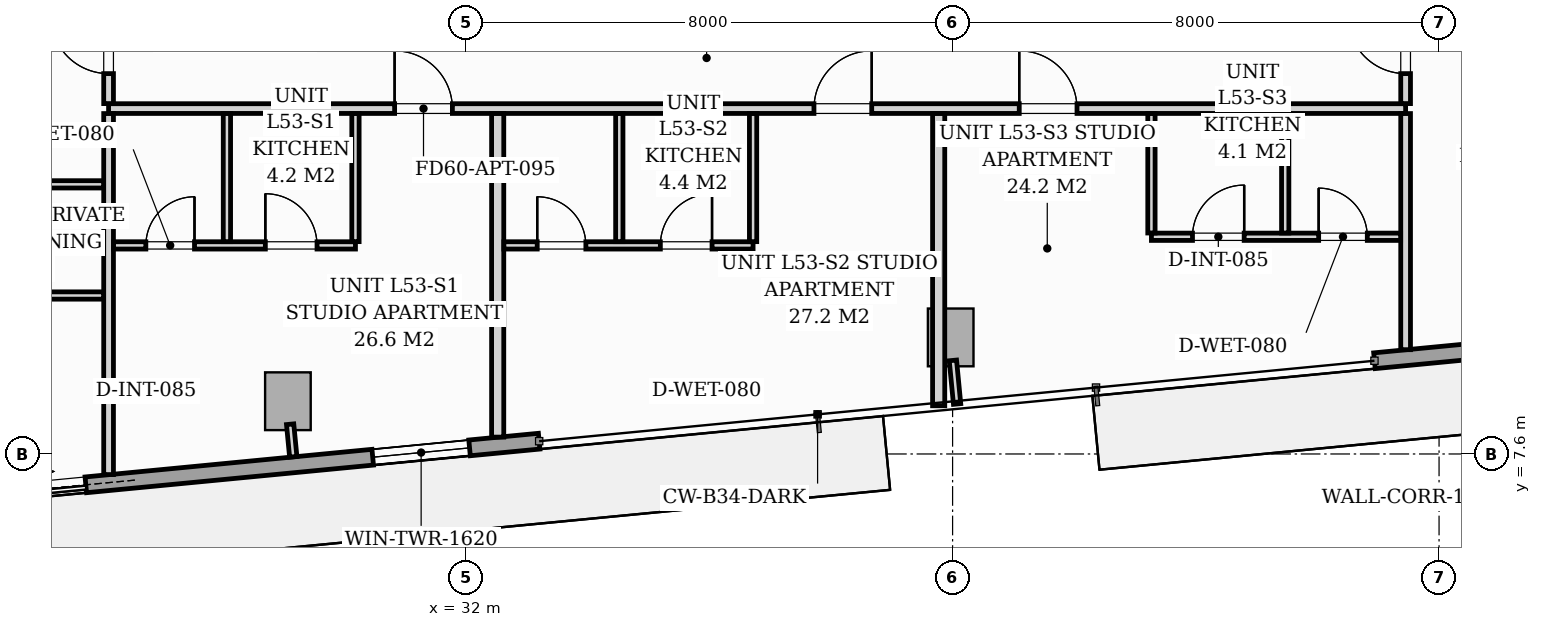
"""IFC4 building model, lengths in metres.
Left out: names, types, materials, properties, quantities, classifications, styles, units other than length and angle.
Written with IfcOpenShell. Run it as: python <this file> out.ifc"""

import sys

from ifc_helpers import new_model, si_unit, direction, frame, frame_2d, origin, origin_2d, place, context, subcontext, project, spatial, rectangle, extrude, source, transform, mapped, element, fill, save


model = new_model("IFC4")
c1 = context("Model", 3, precision=1e-05, world=origin(), true_north=direction((0.0, 1.0)))
c2 = subcontext(c1, "Body", "Model", "MODEL_VIEW")
j1 = project(units=[si_unit("LENGTHUNIT", "METRE"), si_unit("PLANEANGLEUNIT", "RADIAN")], contexts=[c1])
p1 = place(None, origin())
s1 = spatial("IfcSite", under=j1, at=p1, CompositionType="ELEMENT")
p2 = place(p1, origin())
s2 = spatial("IfcBuilding", under=s1, at=p2, CompositionType="ELEMENT")
p3 = place(p2, frame((0.0, 0.0, 185.8)))
s3 = spatial("IfcBuildingStorey", under=s2, at=p3, CompositionType="ELEMENT", Elevation=185.8)
m1 = source(origin(), c2, "Body", "SweptSolid", [
    extrude(rectangle(XDim=0.75, YDim=0.95, at=origin_2d()), origin(), (0.0, 0.0, 1.0), 3.196),
])
for number, where, z_axis, x_axis in (
    (1, (29.069, 8.467, 0.002), (0.0, 0.0, 1.0), (0.995, 0.096, 0.0)),
    (2, (39.969, 9.517, 0.002), (0.0, 0.0, 1.0), (0.995, 0.096, 0.0)),
):
    element("IfcColumn", number, at=place(p3, frame(where, z_axis=z_axis, x_axis=x_axis)), inside=s3, PredefinedType="COLUMN", context=c2, shape_type="MappedRepresentation", body=[
        mapped(m1, transform((0.0, 0.0, 0.0), scale=1.0)),
    ])
p4 = place(p3, frame((62.963, 10.676, 0.0), z_axis=(0.0, 0.0, 1.0), x_axis=(-0.995395627913, -0.095851676732, 0.0)))
e3 = element("IfcWall", 3, at=p4, inside=s3, PredefinedType="STANDARD", context=c2, shape_type="SweptSolid", body=[
    extrude(rectangle(XDim=16.1, YDim=0.26, at=frame_2d((8.05, 0.0))), origin(), (0.0, 0.0, 1.0), 2.94),
])
p5 = place(p4, frame((8.101, 0.0, 0.0)))
e4 = element("IfcOpeningElement", 4, at=p5, cuts=e3, PredefinedType="OPENING", context=c2, shape_type="SweptSolid", body=[
    extrude(rectangle(XDim=1.8, YDim=2.06, at=frame_2d((0.9, 1.03))), frame((0.0, 0.14, 0.0), z_axis=(0.0, -1.0, 0.0), x_axis=(1.0, 0.0, 0.0)), (0.0, 0.0, 1.0), 0.28),
])
p6 = place(p4, frame((2.05, 0.0, 0.65)))
e5 = element("IfcOpeningElement", 5, at=p6, cuts=e3, PredefinedType="OPENING", context=c2, shape_type="SweptSolid", body=[
    extrude(rectangle(XDim=1.6, YDim=1.5, at=frame_2d((0.8, 0.75))), frame((0.0, 0.14, 0.0), z_axis=(0.0, -1.0, 0.0), x_axis=(1.0, 0.0, 0.0)), (0.0, 0.0, 1.0), 0.28),
])
p7 = place(p3, frame((33.201, 7.81, 0.0), z_axis=(0.0, 0.0, 1.0), x_axis=(-0.995397074604, -0.095836652014, 0.0)))
e6 = element("IfcWall", 6, at=p7, inside=s3, PredefinedType="STANDARD", context=c2, shape_type="SweptSolid", body=[
    extrude(rectangle(XDim=16.1, YDim=0.26, at=frame_2d((8.05, 0.0))), origin(), (0.0, 0.0, 1.0), 2.94),
])
p8 = place(p7, frame((7.49, 0.0, 0.0)))
e7 = element("IfcOpeningElement", 7, at=p8, cuts=e6, PredefinedType="OPENING", context=c2, shape_type="SweptSolid", body=[
    extrude(rectangle(XDim=1.8, YDim=2.06, at=frame_2d((0.9, 1.03))), frame((0.0, 0.14, 0.0), z_axis=(0.0, -1.0, 0.0), x_axis=(1.0, 0.0, 0.0)), (0.0, 0.0, 1.0), 0.28),
])
p9 = place(p7, frame((1.15, 0.0, 0.65)))
e8 = element("IfcOpeningElement", 8, at=p9, cuts=e6, PredefinedType="OPENING", context=c2, shape_type="SweptSolid", body=[
    extrude(rectangle(XDim=1.6, YDim=1.5, at=frame_2d((0.8, 0.75))), frame((0.0, 0.14, 0.0), z_axis=(0.0, -1.0, 0.0), x_axis=(1.0, 0.0, 0.0)), (0.0, 0.0, 1.0), 0.28),
])
p10 = place(p3, frame((26.12, 13.28, 0.0), z_axis=(0.0, 0.0, 1.0), x_axis=(1.0, 0.0, 0.0)))
e9 = element("IfcWall", 9, at=p10, inside=s3, PredefinedType="PARTITIONING", context=c2, shape_type="SweptSolid", body=[
    extrude(rectangle(XDim=21.33, YDim=0.16, at=frame_2d((10.665, 0.0))), origin(), (0.0, 0.0, 1.0), 2.94),
])
p11 = place(p10, frame((4.704, 0.0, 0.0)))
e10 = element("IfcOpeningElement", 10, at=p11, cuts=e9, PredefinedType="OPENING", context=c2, shape_type="SweptSolid", body=[
    extrude(rectangle(XDim=0.95, YDim=2.06, at=frame_2d((0.475, 1.03))), frame((0.0, 0.09, 0.0), z_axis=(0.0, -1.0, 0.0), x_axis=(1.0, 0.0, 0.0)), (0.0, 0.0, 1.0), 0.18),
])
p12 = place(p10, frame((11.6, 0.0, 0.0)))
e11 = element("IfcOpeningElement", 11, at=p12, cuts=e9, PredefinedType="OPENING", context=c2, shape_type="SweptSolid", body=[
    extrude(rectangle(XDim=0.95, YDim=2.06, at=frame_2d((0.475, 1.03))), frame((0.0, 0.09, 0.0), z_axis=(0.0, -1.0, 0.0), x_axis=(1.0, 0.0, 0.0)), (0.0, 0.0, 1.0), 0.18),
])
p13 = place(p10, frame((14.976, 0.0, 0.0)))
e12 = element("IfcOpeningElement", 12, at=p13, cuts=e9, PredefinedType="OPENING", context=c2, shape_type="SweptSolid", body=[
    extrude(rectangle(XDim=0.95, YDim=2.06, at=frame_2d((0.475, 1.03))), frame((0.0, 0.09, 0.0), z_axis=(0.0, -1.0, 0.0), x_axis=(1.0, 0.0, 0.0)), (0.0, 0.0, 1.0), 0.18),
])
p14 = place(p3, frame((26.12, 7.261, 0.0), z_axis=(0.0, 0.0, 1.0), x_axis=(0.0, 1.0, 0.0)))
e13 = element("IfcWall", 13, at=p14, inside=s3, PredefinedType="PARTITIONING", context=c2, shape_type="SweptSolid", body=[
    extrude(rectangle(XDim=5.937, YDim=0.16, at=frame_2d((2.968, 0.0))), origin(), (0.0, 0.0, 1.0), 2.94),
])
p15 = place(p3, frame((26.12, 13.362, 0.0), z_axis=(0.0, 0.0, 1.0), x_axis=(0.0, 1.0, 0.0)))
e14 = element("IfcWall", 14, at=p15, inside=s3, PredefinedType="PARTITIONING", context=c2, shape_type="SweptSolid", body=[
    extrude(rectangle(XDim=4.44, YDim=0.16, at=frame_2d((2.22, 0.0))), origin(), (0.0, 0.0, 1.0), 2.94),
])
p16 = place(p15, frame((0.493, 0.0, 0.0)))
e15 = element("IfcOpeningElement", 15, at=p16, cuts=e14, PredefinedType="OPENING", context=c2, shape_type="SweptSolid", body=[
    extrude(rectangle(XDim=0.95, YDim=2.06, at=frame_2d((0.475, 1.03))), frame((0.0, 0.09, 0.0), z_axis=(0.0, -1.0, 0.0), x_axis=(1.0, 0.0, 0.0)), (0.0, 0.0, 1.0), 0.18),
])
p17 = place(p3, frame((47.45, 9.315, 0.0), z_axis=(0.0, 0.0, 1.0), x_axis=(0.0, 1.0, 0.0)))
e16 = element("IfcWall", 16, at=p17, inside=s3, PredefinedType="PARTITIONING", context=c2, shape_type="SweptSolid", body=[
    extrude(rectangle(XDim=3.883, YDim=0.16, at=frame_2d((1.941, 0.0))), origin(), (0.0, 0.0, 1.0), 2.94),
])
p18 = place(p3, frame((47.45, 13.362, 0.0), z_axis=(0.0, 0.0, 1.0), x_axis=(0.0, 1.0, 0.0)))
e17 = element("IfcWall", 17, at=p18, inside=s3, PredefinedType="PARTITIONING", context=c2, shape_type="SweptSolid", body=[
    extrude(rectangle(XDim=7.288, YDim=0.16, at=frame_2d((3.644, 0.0))), origin(), (0.0, 0.0, 1.0), 2.94),
])
p19 = place(p18, frame((0.493, 0.0, 0.0)))
e18 = element("IfcOpeningElement", 18, at=p19, cuts=e17, PredefinedType="OPENING", context=c2, shape_type="SweptSolid", body=[
    extrude(rectangle(XDim=0.95, YDim=2.06, at=frame_2d((0.475, 1.03))), frame((0.0, 0.09, 0.0), z_axis=(0.0, -1.0, 0.0), x_axis=(1.0, 0.0, 0.0)), (0.0, 0.0, 1.0), 0.18),
])
p20 = place(p18, frame((4.783, 0.0, 0.0)))
e19 = element("IfcOpeningElement", 19, at=p20, cuts=e17, PredefinedType="OPENING", context=c2, shape_type="SweptSolid", body=[
    extrude(rectangle(XDim=0.95, YDim=2.06, at=frame_2d((0.475, 1.03))), frame((0.0, 0.09, 0.0), z_axis=(0.0, -1.0, 0.0), x_axis=(1.0, 0.0, 0.0)), (0.0, 0.0, 1.0), 0.18),
])
p21 = place(p3, frame((26.202, 11.03, 0.0), z_axis=(0.0, 0.0, 1.0), x_axis=(1.0, 0.0, 0.0)))
e20 = element("IfcWall", 20, at=p21, inside=s3, PredefinedType="PARTITIONING", context=c2, shape_type="SweptSolid", body=[
    extrude(rectangle(XDim=3.978, YDim=0.12, at=frame_2d((1.989, 0.0))), origin(), (0.0, 0.0, 1.0), 2.94),
])
p22 = place(p21, frame((0.531, 0.0, 0.0)))
e21 = element("IfcOpeningElement", 21, at=p22, cuts=e20, PredefinedType="OPENING", context=c2, shape_type="SweptSolid", body=[
    extrude(rectangle(XDim=0.8, YDim=2.02, at=frame_2d((0.4, 1.01))), frame((0.0, 0.07, 0.0), z_axis=(0.0, -1.0, 0.0), x_axis=(1.0, 0.0, 0.0)), (0.0, 0.0, 1.0), 0.14),
])
p23 = place(p21, frame((2.496, 0.0, 0.0)))
e22 = element("IfcOpeningElement", 22, at=p23, cuts=e20, PredefinedType="OPENING", context=c2, shape_type="SweptSolid", body=[
    extrude(rectangle(XDim=0.85, YDim=2.05, at=frame_2d((0.425, 1.025))), frame((0.0, 0.07, 0.0), z_axis=(0.0, -1.0, 0.0), x_axis=(1.0, 0.0, 0.0)), (0.0, 0.0, 1.0), 0.14),
])
for number, where, z_axis, x_axis in (
    (23, (30.18, 11.092, 0.0), (0.0, 0.0, 1.0), (0.0, 1.0, 0.0)),
    (24, (28.066, 11.092, 0.0), (0.0, 0.0, 1.0), (0.0, 1.0, 0.0)),
):
    element("IfcWall", number, at=place(p3, frame(where, z_axis=z_axis, x_axis=x_axis)), inside=s3, PredefinedType="PARTITIONING", context=c2, shape_type="SweptSolid", body=[
        extrude(rectangle(XDim=2.106, YDim=0.12, at=frame_2d((1.053, 0.0))), origin(), (0.0, 0.0, 1.0), 2.94),
    ])
p24 = place(p3, frame((32.519, 7.877, 0.0), z_axis=(0.0, 0.0, 1.0), x_axis=(0.0, 1.0, 0.0)))
e25 = element("IfcWall", 25, at=p24, inside=s3, PredefinedType="PARTITIONING", context=c2, shape_type="SweptSolid", body=[
    extrude(rectangle(XDim=5.321, YDim=0.2, at=frame_2d((2.66, 0.0))), origin(), (0.0, 0.0, 1.0), 2.94),
])
p25 = place(p3, frame((32.621, 11.03, 0.0), z_axis=(0.0, 0.0, 1.0), x_axis=(1.0, 0.0, 0.0)))
e26 = element("IfcWall", 26, at=p25, inside=s3, PredefinedType="PARTITIONING", context=c2, shape_type="SweptSolid", body=[
    extrude(rectangle(XDim=4.098, YDim=0.12, at=frame_2d((2.049, 0.0))), origin(), (0.0, 0.0, 1.0), 2.94),
])
p26 = place(p25, frame((0.548, 0.0, 0.0)))
e27 = element("IfcOpeningElement", 27, at=p26, cuts=e26, PredefinedType="OPENING", context=c2, shape_type="SweptSolid", body=[
    extrude(rectangle(XDim=0.8, YDim=2.02, at=frame_2d((0.4, 1.01))), frame((0.0, 0.07, 0.0), z_axis=(0.0, -1.0, 0.0), x_axis=(1.0, 0.0, 0.0)), (0.0, 0.0, 1.0), 0.14),
])
p27 = place(p25, frame((2.573, 0.0, 0.0)))
e28 = element("IfcOpeningElement", 28, at=p27, cuts=e26, PredefinedType="OPENING", context=c2, shape_type="SweptSolid", body=[
    extrude(rectangle(XDim=0.85, YDim=2.05, at=frame_2d((0.425, 1.025))), frame((0.0, 0.07, 0.0), z_axis=(0.0, -1.0, 0.0), x_axis=(1.0, 0.0, 0.0)), (0.0, 0.0, 1.0), 0.14),
])
for number, where, z_axis, x_axis in (
    (29, (36.719, 11.092, 0.0), (0.0, 0.0, 1.0), (0.0, 1.0, 0.0)),
    (30, (34.519, 11.092, 0.0), (0.0, 0.0, 1.0), (0.0, 1.0, 0.0)),
):
    element("IfcWall", number, at=place(p3, frame(where, z_axis=z_axis, x_axis=x_axis)), inside=s3, PredefinedType="PARTITIONING", context=c2, shape_type="SweptSolid", body=[
        extrude(rectangle(XDim=2.106, YDim=0.12, at=frame_2d((1.053, 0.0))), origin(), (0.0, 0.0, 1.0), 2.94),
    ])
p28 = place(p3, frame((39.771, 8.393, 0.0), z_axis=(0.0, 0.0, 1.0), x_axis=(0.0, 1.0, 0.0)))
e31 = element("IfcWall", 31, at=p28, inside=s3, PredefinedType="PARTITIONING", context=c2, shape_type="SweptSolid", body=[
    extrude(rectangle(XDim=4.805, YDim=0.2, at=frame_2d((2.403, 0.0))), origin(), (0.0, 0.0, 1.0), 2.94),
])
p29 = place(p3, frame((43.27, 11.172, 0.0), z_axis=(0.0, 0.0, 1.0), x_axis=(1.0, 0.0, 0.0)))
e32 = element("IfcWall", 32, at=p29, inside=s3, PredefinedType="PARTITIONING", context=c2, shape_type="SweptSolid", body=[
    extrude(rectangle(XDim=4.098, YDim=0.12, at=frame_2d((2.049, 0.0))), origin(), (0.0, 0.0, 1.0), 2.94),
])
p30 = place(p29, frame((0.675, 0.0, 0.0)))
e33 = element("IfcOpeningElement", 33, at=p30, cuts=e32, PredefinedType="OPENING", context=c2, shape_type="SweptSolid", body=[
    extrude(rectangle(XDim=0.85, YDim=2.05, at=frame_2d((0.425, 1.025))), frame((0.0, 0.07, 0.0), z_axis=(0.0, -1.0, 0.0), x_axis=(1.0, 0.0, 0.0)), (0.0, 0.0, 1.0), 0.14),
])
p31 = place(p29, frame((2.75, 0.0, 0.0)))
e34 = element("IfcOpeningElement", 34, at=p31, cuts=e32, PredefinedType="OPENING", context=c2, shape_type="SweptSolid", body=[
    extrude(rectangle(XDim=0.8, YDim=2.02, at=frame_2d((0.4, 1.01))), frame((0.0, 0.07, 0.0), z_axis=(0.0, -1.0, 0.0), x_axis=(1.0, 0.0, 0.0)), (0.0, 0.0, 1.0), 0.14),
])
for number, where, z_axis, x_axis in (
    (35, (43.27, 11.234, 0.0), (0.0, 0.0, 1.0), (0.0, 1.0, 0.0)),
    (36, (45.47, 11.234, 0.0), (0.0, 0.0, 1.0), (0.0, 1.0, 0.0)),
):
    element("IfcWall", number, at=place(p3, frame(where, z_axis=z_axis, x_axis=x_axis)), inside=s3, PredefinedType="PARTITIONING", context=c2, shape_type="SweptSolid", body=[
        extrude(rectangle(XDim=1.964, YDim=0.12, at=frame_2d((0.982, 0.0))), origin(), (0.0, 0.0, 1.0), 2.94),
    ])
p32 = place(p3, frame((14.365, 10.206, 0.0), z_axis=(0.0, 0.0, 1.0), x_axis=(1.0, 0.0, 0.0)))
e37 = element("IfcWall", 37, at=p32, inside=s3, PredefinedType="PARTITIONING", context=c2, shape_type="SweptSolid", body=[
    extrude(rectangle(XDim=11.673, YDim=0.12, at=frame_2d((5.837, 0.0))), origin(), (0.0, 0.0, 1.0), 2.94),
])
p33 = place(p32, frame((5.405, 0.0, 0.0)))
e38 = element("IfcOpeningElement", 38, at=p33, cuts=e37, PredefinedType="OPENING", context=c2, shape_type="SweptSolid", body=[
    extrude(rectangle(XDim=0.85, YDim=2.05, at=frame_2d((0.425, 1.025))), frame((0.0, 0.07, 0.0), z_axis=(0.0, -1.0, 0.0), x_axis=(1.0, 0.0, 0.0)), (0.0, 0.0, 1.0), 0.14),
])
p34 = place(p3, frame((14.189, 12.034, 0.0), z_axis=(0.0, 0.0, 1.0), x_axis=(1.0, 0.0, 0.0)))
e39 = element("IfcWall", 39, at=p34, inside=s3, PredefinedType="PARTITIONING", context=c2, shape_type="SweptSolid", body=[
    extrude(rectangle(XDim=11.849, YDim=0.12, at=frame_2d((5.925, 0.0))), origin(), (0.0, 0.0, 1.0), 2.94),
])
p35 = place(p34, frame((5.493, 0.0, 0.0)))
e40 = element("IfcOpeningElement", 40, at=p35, cuts=e39, PredefinedType="OPENING", context=c2, shape_type="SweptSolid", body=[
    extrude(rectangle(XDim=0.85, YDim=2.05, at=frame_2d((0.425, 1.025))), frame((0.0, 0.07, 0.0), z_axis=(0.0, -1.0, 0.0), x_axis=(1.0, 0.0, 0.0)), (0.0, 0.0, 1.0), 0.14),
])
p36 = place(p3, frame((29.105, 8.089, 0.0), z_axis=(0.0, 0.0, 1.0), x_axis=(0.095772948675, -0.995403205893, 0.0)))
e41 = element("IfcWall", 41, at=p36, inside=s3, PredefinedType="PARTITIONING", context=c2, shape_type="SweptSolid", body=[
    extrude(rectangle(XDim=0.538, YDim=0.12, at=frame_2d((0.269, 0.0))), origin(), (0.0, 0.0, 1.0), 2.94),
])
p37 = place(p3, frame((40.005, 9.139, 0.0), z_axis=(0.0, 0.0, 1.0), x_axis=(0.095977354523, -0.995383517755, 0.0)))
e42 = element("IfcWall", 42, at=p37, inside=s3, PredefinedType="PARTITIONING", context=c2, shape_type="SweptSolid", body=[
    extrude(rectangle(XDim=0.72, YDim=0.12, at=frame_2d((0.36, 0.0))), origin(), (0.0, 0.0, 1.0), 2.94),
])
m2 = source(origin(), c2, "Body", "SweptSolid", [
    extrude(rectangle(XDim=1.8, YDim=2.06, at=frame_2d((0.9, 1.03))), frame((0.0, 0.025, 0.0), z_axis=(0.0, -1.0, 0.0), x_axis=(1.0, 0.0, 0.0)), (0.0, 0.0, 1.0), 0.05),
])
p38 = place(p8, origin())
e43 = element("IfcDoor", 43, at=p38, inside=s3, OperationType="SLIDING_TO_LEFT", PredefinedType="DOOR", context=c2, shape_type="MappedRepresentation", body=[
    mapped(m2, transform((0.0, 0.0, 0.0), scale=1.0)),
])
fill(e7, e43)
m3 = source(origin(), c2, "Body", "SweptSolid", [
    extrude(rectangle(XDim=1.6, YDim=1.5, at=frame_2d((0.8, 0.75))), frame((0.0, 0.03, 0.0), z_axis=(0.0, -1.0, 0.0), x_axis=(1.0, 0.0, 0.0)), (0.0, 0.0, 1.0), 0.06),
])
p39 = place(p9, origin())
e44 = element("IfcWindow", 44, at=p39, inside=s3, PartitioningType="SINGLE_PANEL", PredefinedType="WINDOW", context=c2, shape_type="MappedRepresentation", body=[
    mapped(m3, transform((0.0, 0.0, 0.0), scale=1.0)),
])
fill(e8, e44)
m4 = source(origin(), c2, "Body", "SweptSolid", [
    extrude(rectangle(XDim=0.95, YDim=2.06, at=frame_2d((0.475, 1.03))), frame((0.0, 0.025, 0.0), z_axis=(0.0, -1.0, 0.0), x_axis=(1.0, 0.0, 0.0)), (0.0, 0.0, 1.0), 0.05),
])
p40 = place(p11, origin())
e45 = element("IfcDoor", 45, at=p40, inside=s3, OperationType="SINGLE_SWING_LEFT", PredefinedType="DOOR", context=c2, shape_type="MappedRepresentation", body=[
    mapped(m4, transform((0.0, 0.0, 0.0), scale=1.0)),
])
fill(e10, e45)
m5 = source(origin(), c2, "Body", "SweptSolid", [
    extrude(rectangle(XDim=0.8, YDim=2.02, at=frame_2d((0.4, 1.01))), frame((0.0, 0.025, 0.0), z_axis=(0.0, -1.0, 0.0), x_axis=(1.0, 0.0, 0.0)), (0.0, 0.0, 1.0), 0.05),
])
p41 = place(p22, origin())
e46 = element("IfcDoor", 46, at=p41, inside=s3, OperationType="SINGLE_SWING_RIGHT", PredefinedType="DOOR", context=c2, shape_type="MappedRepresentation", body=[
    mapped(m5, transform((0.0, 0.0, 0.0), scale=1.0)),
])
fill(e21, e46)
m6 = source(origin(), c2, "Body", "SweptSolid", [
    extrude(rectangle(XDim=0.85, YDim=2.05, at=frame_2d((0.425, 1.025))), frame((0.0, 0.025, 0.0), z_axis=(0.0, -1.0, 0.0), x_axis=(1.0, 0.0, 0.0)), (0.0, 0.0, 1.0), 0.05),
])
p42 = place(p23, origin())
e47 = element("IfcDoor", 47, at=p42, inside=s3, OperationType="SINGLE_SWING_LEFT", PredefinedType="DOOR", context=c2, shape_type="MappedRepresentation", body=[
    mapped(m6, transform((0.0, 0.0, 0.0), scale=1.0)),
])
fill(e22, e47)
p43 = place(p12, origin())
e48 = element("IfcDoor", 48, at=p43, inside=s3, OperationType="SINGLE_SWING_RIGHT", PredefinedType="DOOR", context=c2, shape_type="MappedRepresentation", body=[
    mapped(m4, transform((0.0, 0.0, 0.0), scale=1.0)),
])
fill(e11, e48)
p44 = place(p26, origin())
e49 = element("IfcDoor", 49, at=p44, inside=s3, OperationType="SINGLE_SWING_LEFT", PredefinedType="DOOR", context=c2, shape_type="MappedRepresentation", body=[
    mapped(m5, transform((0.0, 0.0, 0.0), scale=1.0)),
])
fill(e27, e49)
p45 = place(p27, origin())
e50 = element("IfcDoor", 50, at=p45, inside=s3, OperationType="SINGLE_SWING_RIGHT", PredefinedType="DOOR", context=c2, shape_type="MappedRepresentation", body=[
    mapped(m6, transform((0.0, 0.0, 0.0), scale=1.0)),
])
fill(e28, e50)
p46 = place(p13, origin())
e51 = element("IfcDoor", 51, at=p46, inside=s3, OperationType="SINGLE_SWING_LEFT", PredefinedType="DOOR", context=c2, shape_type="MappedRepresentation", body=[
    mapped(m4, transform((0.0, 0.0, 0.0), scale=1.0)),
])
fill(e12, e51)
p47 = place(p30, origin())
e52 = element("IfcDoor", 52, at=p47, inside=s3, OperationType="SINGLE_SWING_RIGHT", PredefinedType="DOOR", context=c2, shape_type="MappedRepresentation", body=[
    mapped(m6, transform((0.0, 0.0, 0.0), scale=1.0)),
])
fill(e33, e52)
p48 = place(p31, origin())
e53 = element("IfcDoor", 53, at=p48, inside=s3, OperationType="SINGLE_SWING_LEFT", PredefinedType="DOOR", context=c2, shape_type="MappedRepresentation", body=[
    mapped(m5, transform((0.0, 0.0, 0.0), scale=1.0)),
])
fill(e34, e53)
p49 = place(p16, origin())
e54 = element("IfcDoor", 54, at=p49, inside=s3, OperationType="SINGLE_SWING_RIGHT", PredefinedType="DOOR", context=c2, shape_type="MappedRepresentation", body=[
    mapped(m4, transform((0.0, 0.0, 0.0), scale=1.0)),
])
fill(e15, e54)
p50 = place(p19, origin())
e55 = element("IfcDoor", 55, at=p50, inside=s3, OperationType="SINGLE_SWING_RIGHT", PredefinedType="DOOR", context=c2, shape_type="MappedRepresentation", body=[
    mapped(m4, transform((0.0, 0.0, 0.0), scale=1.0)),
])
fill(e18, e55)
save(model, sys.argv[1])
